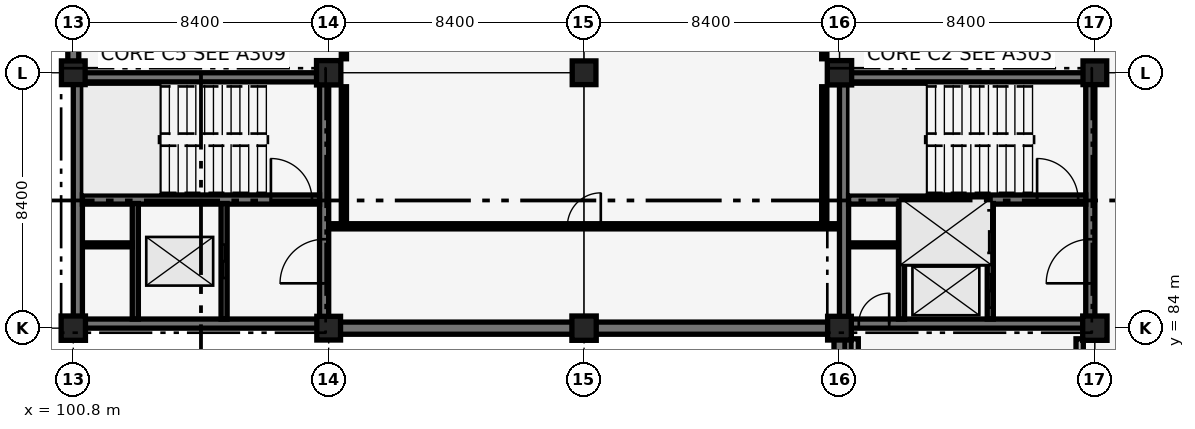
"""IFC4 building model, lengths in metres.
Left out: names, types, materials, properties, quantities, classifications, styles, units other than length and angle.
Written with IfcOpenShell. Run it as: python <this file> out.ifc"""

import sys

from ifc_helpers import new_model, si_unit, direction, frame, frame_2d, origin, origin_2d, place, context, subcontext, project, spatial, rectangle, extrude, element, fill, save


model = new_model("IFC4")
c1 = context("Model", 3, precision=1e-05, world=origin(), true_north=direction((0.0, 1.0)))
c2 = subcontext(c1, "Body", "Model", "MODEL_VIEW")
j1 = project(units=[si_unit("LENGTHUNIT", "METRE"), si_unit("PLANEANGLEUNIT", "RADIAN")], contexts=[c1])
p1 = place(None, origin())
s1 = spatial("IfcSite", under=j1, at=p1, CompositionType="ELEMENT")
p2 = place(p1, origin())
s2 = spatial("IfcBuilding", under=s1, at=p2, CompositionType="ELEMENT")
p3 = place(p2, frame((0.0, 0.0, -4.42)))
s3 = spatial("IfcBuildingStorey", under=s2, at=p3, CompositionType="ELEMENT", Elevation=-4.42)
p4 = place(p3, frame((100.8, 92.75, 0.0), z_axis=(0.0, 0.0, 1.0), x_axis=(0.0, 1.0, 0.0)))
e1 = element("IfcWall", 1, at=p4, inside=s3, PredefinedType="USERDEFINED", context=c2, shape_type="SweptSolid", body=[
    extrude(rectangle(XDim=7.7, YDim=0.36, at=frame_2d((3.85, 0.0))), origin(), (0.0, 0.0, 1.0), 4.12),
])
for number, where, z_axis, x_axis in (
    (2, (109.55, 84.0, 0.0), (0.0, 0.0, 1.0), (1.0, 0.0, 0.0)),
    (3, (117.95, 84.0, 0.0), (0.0, 0.0, 1.0), (1.0, 0.0, 0.0)),
):
    element("IfcWall", number, at=place(p3, frame(where, z_axis=z_axis, x_axis=x_axis)), inside=s3, PredefinedType="USERDEFINED", context=c2, shape_type="SweptSolid", body=[
        extrude(rectangle(XDim=7.7, YDim=0.4, at=frame_2d((3.85, 0.0))), origin(), (0.0, 0.0, 1.0), 4.12),
    ])
p5 = place(p3, frame((126.0, 75.95, 0.0), z_axis=(0.0, 0.0, 1.0), x_axis=(0.0, 1.0, 0.0)))
e4 = element("IfcWall", 4, at=p5, inside=s3, PredefinedType="USERDEFINED", context=c2, shape_type="SweptSolid", body=[
    extrude(rectangle(XDim=7.7, YDim=0.36, at=frame_2d((3.85, 0.0))), origin(), (0.0, 0.0, 1.0), 4.12),
])
p6 = place(p3, frame((126.15, 84.15, 0.0), z_axis=(0.0, 0.0, 1.0), x_axis=(1.0, 0.0, 0.0)))
e5 = element("IfcWall", 5, at=p6, inside=s3, PredefinedType="SHEAR", context=c2, shape_type="SweptSolid", body=[
    extrude(rectangle(XDim=8.1, YDim=0.3, at=frame_2d((4.05, 0.0))), origin(), (0.0, 0.0, 1.0), 4.12),
])
p7 = place(p6, frame((0.485, 0.0, 0.0)))
e6 = element("IfcOpeningElement", 6, at=p7, cuts=e5, PredefinedType="OPENING", context=c2, shape_type="SweptSolid", body=[
    extrude(rectangle(XDim=1.0, YDim=2.15, at=frame_2d((0.5, 1.075))), frame((0.0, 0.16, 0.0), z_axis=(0.0, -1.0, 0.0), x_axis=(1.0, 0.0, 0.0)), (0.0, 0.0, 1.0), 0.32),
])
for number, where, z_axis, x_axis in (
    (7, (126.15, 92.25, 0.0), (0.0, 0.0, 1.0), (1.0, 0.0, 0.0)),
    (8, (126.15, 84.15, 0.0), (0.0, 0.0, 1.0), (0.0, 1.0, 0.0)),
):
    element("IfcWall", number, at=place(p3, frame(where, z_axis=z_axis, x_axis=x_axis)), inside=s3, PredefinedType="SHEAR", context=c2, shape_type="SweptSolid", body=[
        extrude(rectangle(XDim=8.1, YDim=0.3, at=frame_2d((4.05, 0.0))), origin(), (0.0, 0.0, 1.0), 4.12),
    ])
p8 = place(p3, frame((134.25, 84.15, 0.0), z_axis=(0.0, 0.0, 1.0), x_axis=(0.0, 1.0, 0.0)))
e9 = element("IfcWall", 9, at=p8, inside=s3, PredefinedType="SHEAR", context=c2, shape_type="SweptSolid", body=[
    extrude(rectangle(XDim=8.1, YDim=0.3, at=frame_2d((4.05, 0.0))), origin(), (0.0, 0.0, 1.0), 4.12),
])
p9 = place(p8, frame((1.325, 0.0, 0.0)))
e10 = element("IfcOpeningElement", 10, at=p9, cuts=e9, PredefinedType="OPENING", context=c2, shape_type="SweptSolid", body=[
    extrude(rectangle(XDim=1.45, YDim=2.15, at=frame_2d((0.725, 1.075))), frame((0.0, 0.16, 0.0), z_axis=(0.0, -1.0, 0.0), x_axis=(1.0, 0.0, 0.0)), (0.0, 0.0, 1.0), 0.32),
])
p10 = place(p3, frame((126.3, 88.23, 0.0), z_axis=(0.0, 0.0, 1.0), x_axis=(1.0, 0.0, 0.0)))
e11 = element("IfcWall", 11, at=p10, inside=s3, PredefinedType="SHEAR", context=c2, shape_type="SweptSolid", body=[
    extrude(rectangle(XDim=7.8, YDim=0.3, at=frame_2d((3.9, 0.0))), origin(), (0.0, 0.0, 1.0), 4.12),
])
p11 = place(p10, frame((6.2, 0.0, 0.0)))
e12 = element("IfcOpeningElement", 12, at=p11, cuts=e11, PredefinedType="OPENING", context=c2, shape_type="SweptSolid", body=[
    extrude(rectangle(XDim=1.35, YDim=2.15, at=frame_2d((0.675, 1.075))), frame((0.0, 0.16, 0.0), z_axis=(0.0, -1.0, 0.0), x_axis=(1.0, 0.0, 0.0)), (0.0, 0.0, 1.0), 0.32),
])
for number, where, z_axis, x_axis in (
    (13, (100.95, 84.15, 0.0), (0.0, 0.0, 1.0), (1.0, 0.0, 0.0)),
    (14, (100.95, 92.25, 0.0), (0.0, 0.0, 1.0), (1.0, 0.0, 0.0)),
    (15, (100.95, 84.15, 0.0), (0.0, 0.0, 1.0), (0.0, 1.0, 0.0)),
):
    element("IfcWall", number, at=place(p3, frame(where, z_axis=z_axis, x_axis=x_axis)), inside=s3, PredefinedType="SHEAR", context=c2, shape_type="SweptSolid", body=[
        extrude(rectangle(XDim=8.1, YDim=0.3, at=frame_2d((4.05, 0.0))), origin(), (0.0, 0.0, 1.0), 4.12),
    ])
p12 = place(p3, frame((109.05, 84.15, 0.0), z_axis=(0.0, 0.0, 1.0), x_axis=(0.0, 1.0, 0.0)))
e16 = element("IfcWall", 16, at=p12, inside=s3, PredefinedType="SHEAR", context=c2, shape_type="SweptSolid", body=[
    extrude(rectangle(XDim=8.1, YDim=0.3, at=frame_2d((4.05, 0.0))), origin(), (0.0, 0.0, 1.0), 4.12),
])
p13 = place(p12, frame((1.325, 0.0, 0.0)))
e17 = element("IfcOpeningElement", 17, at=p13, cuts=e16, PredefinedType="OPENING", context=c2, shape_type="SweptSolid", body=[
    extrude(rectangle(XDim=1.45, YDim=2.15, at=frame_2d((0.725, 1.075))), frame((0.0, 0.16, 0.0), z_axis=(0.0, -1.0, 0.0), x_axis=(1.0, 0.0, 0.0)), (0.0, 0.0, 1.0), 0.32),
])
p14 = place(p3, frame((101.1, 88.23, 0.0), z_axis=(0.0, 0.0, 1.0), x_axis=(1.0, 0.0, 0.0)))
e18 = element("IfcWall", 18, at=p14, inside=s3, PredefinedType="SHEAR", context=c2, shape_type="SweptSolid", body=[
    extrude(rectangle(XDim=7.8, YDim=0.3, at=frame_2d((3.9, 0.0))), origin(), (0.0, 0.0, 1.0), 4.12),
])
p15 = place(p14, frame((6.2, 0.0, 0.0)))
e19 = element("IfcOpeningElement", 19, at=p15, cuts=e18, PredefinedType="OPENING", context=c2, shape_type="SweptSolid", body=[
    extrude(rectangle(XDim=1.35, YDim=2.15, at=frame_2d((0.675, 1.075))), frame((0.0, 0.16, 0.0), z_axis=(0.0, -1.0, 0.0), x_axis=(1.0, 0.0, 0.0)), (0.0, 0.0, 1.0), 0.32),
])
p16 = place(p3, frame((100.8, 84.0, -0.4), z_axis=(0.0, 0.0, 1.0), x_axis=(1.0, 0.0, 0.0)))
e20 = element("IfcColumn", 20, at=p16, inside=s3, PredefinedType="COLUMN", context=c2, shape_type="SweptSolid", body=[
    extrude(rectangle(XDim=0.8, YDim=0.8, at=origin_2d()), origin(), (0.0, 0.0, 1.0), 4.52),
])
for number, where, z_axis, x_axis in (
    (21, (100.8, 92.4, -0.4), (0.0, 0.0, 1.0), (1.0, 0.0, 0.0)),
    (22, (109.2, 84.0, -0.4), (0.0, 0.0, 1.0), (1.0, 0.0, 0.0)),
):
    element("IfcColumn", number, at=place(p3, frame(where, z_axis=z_axis, x_axis=x_axis)), inside=s3, PredefinedType="COLUMN", context=c2, shape_type="SweptSolid", body=[
        extrude(rectangle(XDim=0.78, YDim=0.78, at=origin_2d()), origin(), (0.0, 0.0, 1.0), 4.52),
    ])
for number, where, z_axis, x_axis in (
    (23, (109.2, 92.4, -0.4), (0.0, 0.0, 1.0), (1.0, 0.0, 0.0)),
    (24, (117.6, 84.0, -0.4), (0.0, 0.0, 1.0), (1.0, 0.0, 0.0)),
):
    element("IfcColumn", number, at=place(p3, frame(where, z_axis=z_axis, x_axis=x_axis)), inside=s3, PredefinedType="COLUMN", context=c2, shape_type="SweptSolid", body=[
        extrude(rectangle(XDim=0.8, YDim=0.8, at=origin_2d()), origin(), (0.0, 0.0, 1.0), 4.52),
    ])
for number, where, z_axis, x_axis in (
    (25, (117.6, 92.4, -0.4), (0.0, 0.0, 1.0), (1.0, 0.0, 0.0)),
    (26, (126.0, 84.0, -0.4), (0.0, 0.0, 1.0), (1.0, 0.0, 0.0)),
):
    element("IfcColumn", number, at=place(p3, frame(where, z_axis=z_axis, x_axis=x_axis)), inside=s3, PredefinedType="COLUMN", context=c2, shape_type="SweptSolid", body=[
        extrude(rectangle(XDim=0.78, YDim=0.78, at=origin_2d()), origin(), (0.0, 0.0, 1.0), 4.52),
    ])
for number, where, z_axis, x_axis in (
    (27, (126.0, 92.4, -0.4), (0.0, 0.0, 1.0), (1.0, 0.0, 0.0)),
    (28, (134.4, 84.0, -0.4), (0.0, 0.0, 1.0), (1.0, 0.0, 0.0)),
):
    element("IfcColumn", number, at=place(p3, frame(where, z_axis=z_axis, x_axis=x_axis)), inside=s3, PredefinedType="COLUMN", context=c2, shape_type="SweptSolid", body=[
        extrude(rectangle(XDim=0.8, YDim=0.8, at=origin_2d()), origin(), (0.0, 0.0, 1.0), 4.52),
    ])
p17 = place(p3, frame((134.4, 92.4, -0.4), z_axis=(0.0, 0.0, 1.0), x_axis=(1.0, 0.0, 0.0)))
e29 = element("IfcColumn", 29, at=p17, inside=s3, PredefinedType="COLUMN", context=c2, shape_type="SweptSolid", body=[
    extrude(rectangle(XDim=0.78, YDim=0.78, at=origin_2d()), origin(), (0.0, 0.0, 1.0), 4.52),
])
p18 = place(p3, frame((130.96, 84.3, 0.0), z_axis=(0.0, 0.0, 1.0), x_axis=(0.0, 1.0, 0.0)))
e30 = element("IfcWall", 30, at=p18, inside=s3, PredefinedType="SHEAR", context=c2, shape_type="SweptSolid", body=[
    extrude(rectangle(XDim=3.8, YDim=0.2, at=frame_2d((1.9, 0.0))), origin(), (0.0, 0.0, 1.0), 3.17),
])
p19 = place(p18, frame((0.375, 0.0, 0.0)))
e31 = element("IfcOpeningElement", 31, at=p19, cuts=e30, PredefinedType="OPENING", context=c2, shape_type="SweptSolid", body=[
    extrude(rectangle(XDim=1.1, YDim=2.15, at=frame_2d((0.55, 1.075))), frame((0.0, 0.11, 0.0), z_axis=(0.0, -1.0, 0.0), x_axis=(1.0, 0.0, 0.0)), (0.0, 0.0, 1.0), 0.22),
])
p20 = place(p18, frame((2.175, 0.0, 0.0)))
e32 = element("IfcOpeningElement", 32, at=p20, cuts=e30, PredefinedType="OPENING", context=c2, shape_type="SweptSolid", body=[
    extrude(rectangle(XDim=1.4, YDim=2.2, at=frame_2d((0.7, 1.1))), frame((0.0, 0.11, 0.0), z_axis=(0.0, -1.0, 0.0), x_axis=(1.0, 0.0, 0.0)), (0.0, 0.0, 1.0), 0.22),
])
p21 = place(p3, frame((128.04, 84.3, 0.0), z_axis=(0.0, 0.0, 1.0), x_axis=(0.0, 1.0, 0.0)))
e33 = element("IfcWall", 33, at=p21, inside=s3, PredefinedType="SHEAR", context=c2, shape_type="SweptSolid", body=[
    extrude(rectangle(XDim=3.8, YDim=0.2, at=frame_2d((1.9, 0.0))), origin(), (0.0, 0.0, 1.0), 3.17),
])
p22 = place(p3, frame((128.15, 86.2, 0.0), z_axis=(0.0, 0.0, 1.0), x_axis=(1.0, 0.0, 0.0)))
e34 = element("IfcWall", 34, at=p22, inside=s3, PredefinedType="SHEAR", context=c2, shape_type="SweptSolid", body=[
    extrude(rectangle(XDim=2.7, YDim=0.18, at=frame_2d((1.35, 0.0))), origin(), (0.0, 0.0, 1.0), 4.12),
])
p23 = place(p3, frame((126.32, 86.74, 0.0), z_axis=(0.0, 0.0, 1.0), x_axis=(1.0, 0.0, 0.0)))
e35 = element("IfcWall", 35, at=p23, inside=s3, PredefinedType="PARTITIONING", context=c2, shape_type="SweptSolid", body=[
    extrude(rectangle(XDim=1.62, YDim=0.13, at=frame_2d((0.81, 0.0))), origin(), (0.0, 0.0, 1.0), 4.12),
])
p24 = place(p3, frame((105.76, 84.3, 0.0), z_axis=(0.0, 0.0, 1.0), x_axis=(0.0, 1.0, 0.0)))
e36 = element("IfcWall", 36, at=p24, inside=s3, PredefinedType="SHEAR", context=c2, shape_type="SweptSolid", body=[
    extrude(rectangle(XDim=3.8, YDim=0.2, at=frame_2d((1.9, 0.0))), origin(), (0.0, 0.0, 1.0), 3.36),
])
p25 = place(p24, frame((1.35, 0.0, 0.0)))
e37 = element("IfcOpeningElement", 37, at=p25, cuts=e36, PredefinedType="OPENING", context=c2, shape_type="SweptSolid", body=[
    extrude(rectangle(XDim=1.1, YDim=2.15, at=frame_2d((0.55, 1.075))), frame((0.0, 0.11, 0.0), z_axis=(0.0, -1.0, 0.0), x_axis=(1.0, 0.0, 0.0)), (0.0, 0.0, 1.0), 0.22),
])
p26 = place(p3, frame((102.84, 84.3, 0.0), z_axis=(0.0, 0.0, 1.0), x_axis=(0.0, 1.0, 0.0)))
e38 = element("IfcWall", 38, at=p26, inside=s3, PredefinedType="SHEAR", context=c2, shape_type="SweptSolid", body=[
    extrude(rectangle(XDim=3.8, YDim=0.2, at=frame_2d((1.9, 0.0))), origin(), (0.0, 0.0, 1.0), 3.36),
])
p27 = place(p3, frame((101.12, 86.74, 0.0), z_axis=(0.0, 0.0, 1.0), x_axis=(1.0, 0.0, 0.0)))
e39 = element("IfcWall", 39, at=p27, inside=s3, PredefinedType="PARTITIONING", context=c2, shape_type="SweptSolid", body=[
    extrude(rectangle(XDim=1.62, YDim=0.13, at=frame_2d((0.81, 0.0))), origin(), (0.0, 0.0, 1.0), 3.35),
])
p28 = place(p3, frame((133.9, 76.05, 0.0), z_axis=(0.0, 0.0, 1.0), x_axis=(0.0, 1.0, 0.0)))
e40 = element("IfcWall", 40, at=p28, inside=s3, PredefinedType="PARTITIONING", context=c2, shape_type="SweptSolid", body=[
    extrude(rectangle(XDim=7.6, YDim=0.24, at=frame_2d((3.8, 0.0))), origin(), (0.0, 0.0, 1.0), 3.17),
])
p29 = place(p3, frame((126.5, 76.06, 0.0), z_axis=(0.0, 0.0, 1.0), x_axis=(0.0, 1.0, 0.0)))
e41 = element("IfcWall", 41, at=p29, inside=s3, PredefinedType="PARTITIONING", context=c2, shape_type="SweptSolid", body=[
    extrude(rectangle(XDim=7.59, YDim=0.24, at=frame_2d((3.795, 0.0))), origin(), (0.0, 0.0, 1.0), 3.17),
])
p30 = place(p3, frame((109.23, 87.35, 0.0), z_axis=(0.0, 0.0, 1.0), x_axis=(1.0, 0.0, 0.0)))
e42 = element("IfcWall", 42, at=p30, inside=s3, PredefinedType="PARTITIONING", context=c2, shape_type="SweptSolid", body=[
    extrude(rectangle(XDim=16.74, YDim=0.17, at=frame_2d((8.37, 0.0))), origin(), (0.0, 0.0, 1.0), 3.32),
])
p31 = place(p30, frame((7.82, 0.0, 0.0)))
e43 = element("IfcOpeningElement", 43, at=p31, cuts=e42, PredefinedType="OPENING", context=c2, shape_type="SweptSolid", body=[
    extrude(rectangle(XDim=1.1, YDim=2.15, at=frame_2d((0.55, 1.075))), frame((0.0, 0.095, 0.0), z_axis=(0.0, -1.0, 0.0), x_axis=(1.0, 0.0, 0.0)), (0.0, 0.0, 1.0), 0.19),
])
p32 = place(p3, frame((109.7, 87.5, 0.0), z_axis=(0.0, 0.0, 1.0), x_axis=(0.0, 1.0, 0.0)))
e44 = element("IfcWall", 44, at=p32, inside=s3, PredefinedType="PARTITIONING", context=c2, shape_type="SweptSolid", body=[
    extrude(rectangle(XDim=4.44, YDim=0.17, at=frame_2d((2.22, 0.0))), origin(), (0.0, 0.0, 1.0), 3.56),
])
p33 = place(p3, frame((109.7, 92.86, 0.0), z_axis=(0.0, 0.0, 1.0), x_axis=(0.0, 1.0, 0.0)))
e45 = element("IfcWall", 45, at=p33, inside=s3, PredefinedType="PARTITIONING", context=c2, shape_type="SweptSolid", body=[
    extrude(rectangle(XDim=7.49, YDim=0.17, at=frame_2d((3.745, 0.0))), origin(), (0.0, 0.0, 1.0), 3.57),
])
p34 = place(p3, frame((125.5, 87.5, 0.0), z_axis=(0.0, 0.0, 1.0), x_axis=(0.0, 1.0, 0.0)))
e46 = element("IfcWall", 46, at=p34, inside=s3, PredefinedType="PARTITIONING", context=c2, shape_type="SweptSolid", body=[
    extrude(rectangle(XDim=4.44, YDim=0.17, at=frame_2d((2.22, 0.0))), origin(), (0.0, 0.0, 1.0), 3.57),
])
p35 = place(p3, frame((125.5, 92.86, 0.0), z_axis=(0.0, 0.0, 1.0), x_axis=(0.0, 1.0, 0.0)))
e47 = element("IfcWall", 47, at=p35, inside=s3, PredefinedType="PARTITIONING", context=c2, shape_type="SweptSolid", body=[
    extrude(rectangle(XDim=7.49, YDim=0.17, at=frame_2d((3.745, 0.0))), origin(), (0.0, 0.0, 1.0), 3.56),
])
p36 = place(p11, origin())
e48 = element("IfcDoor", 48, at=p36, inside=s3, OperationType="SINGLE_SWING_LEFT", PredefinedType="DOOR", context=c2, shape_type="SweptSolid", body=[
    extrude(rectangle(XDim=1.35, YDim=2.15, at=frame_2d((0.675, 1.075))), frame((0.0, 0.025, 0.0), z_axis=(0.0, -1.0, 0.0), x_axis=(1.0, 0.0, 0.0)), (0.0, 0.0, 1.0), 0.05),
])
fill(e12, e48)
p37 = place(p19, origin())
e49 = element("IfcDoor", 49, at=p37, inside=s3, OperationType="SLIDING_TO_LEFT", PredefinedType="DOOR", context=c2, shape_type="SweptSolid", body=[
    extrude(rectangle(XDim=1.1, YDim=2.15, at=frame_2d((0.55, 1.075))), frame((0.0, 0.025, 0.0), z_axis=(0.0, -1.0, 0.0), x_axis=(1.0, 0.0, 0.0)), (0.0, 0.0, 1.0), 0.05),
])
fill(e31, e49)
p38 = place(p20, origin())
e50 = element("IfcDoor", 50, at=p38, inside=s3, OperationType="SLIDING_TO_LEFT", PredefinedType="DOOR", context=c2, shape_type="SweptSolid", body=[
    extrude(rectangle(XDim=1.4, YDim=2.2, at=frame_2d((0.7, 1.1))), frame((0.0, 0.025, 0.0), z_axis=(0.0, -1.0, 0.0), x_axis=(1.0, 0.0, 0.0)), (0.0, 0.0, 1.0), 0.05),
])
fill(e32, e50)
p39 = place(p9, origin())
e51 = element("IfcDoor", 51, at=p39, inside=s3, OperationType="DOUBLE_DOOR_SINGLE_SWING", PredefinedType="DOOR", context=c2, shape_type="SweptSolid", body=[
    extrude(rectangle(XDim=1.45, YDim=2.15, at=frame_2d((0.725, 1.075))), frame((0.0, 0.025, 0.0), z_axis=(0.0, -1.0, 0.0), x_axis=(1.0, 0.0, 0.0)), (0.0, 0.0, 1.0), 0.05),
])
fill(e10, e51)
p40 = place(p7, origin())
e52 = element("IfcDoor", 52, at=p40, inside=s3, OperationType="SINGLE_SWING_RIGHT", PredefinedType="DOOR", context=c2, shape_type="SweptSolid", body=[
    extrude(rectangle(XDim=1.0, YDim=2.15, at=frame_2d((0.5, 1.075))), frame((0.0, 0.025, 0.0), z_axis=(0.0, -1.0, 0.0), x_axis=(1.0, 0.0, 0.0)), (0.0, 0.0, 1.0), 0.05),
])
fill(e6, e52)
p41 = place(p15, origin())
e53 = element("IfcDoor", 53, at=p41, inside=s3, OperationType="SINGLE_SWING_LEFT", PredefinedType="DOOR", context=c2, shape_type="SweptSolid", body=[
    extrude(rectangle(XDim=1.35, YDim=2.15, at=frame_2d((0.675, 1.075))), frame((0.0, 0.025, 0.0), z_axis=(0.0, -1.0, 0.0), x_axis=(1.0, 0.0, 0.0)), (0.0, 0.0, 1.0), 0.05),
])
fill(e19, e53)
p42 = place(p25, origin())
e54 = element("IfcDoor", 54, at=p42, inside=s3, OperationType="SLIDING_TO_LEFT", PredefinedType="DOOR", context=c2, shape_type="SweptSolid", body=[
    extrude(rectangle(XDim=1.1, YDim=2.15, at=frame_2d((0.55, 1.075))), frame((0.0, 0.025, 0.0), z_axis=(0.0, -1.0, 0.0), x_axis=(1.0, 0.0, 0.0)), (0.0, 0.0, 1.0), 0.05),
])
fill(e37, e54)
p43 = place(p13, origin())
e55 = element("IfcDoor", 55, at=p43, inside=s3, OperationType="DOUBLE_DOOR_SINGLE_SWING", PredefinedType="DOOR", context=c2, shape_type="SweptSolid", body=[
    extrude(rectangle(XDim=1.45, YDim=2.15, at=frame_2d((0.725, 1.075))), frame((0.0, 0.025, 0.0), z_axis=(0.0, -1.0, 0.0), x_axis=(1.0, 0.0, 0.0)), (0.0, 0.0, 1.0), 0.05),
])
fill(e17, e55)
p44 = place(p31, origin())
e56 = element("IfcDoor", 56, at=p44, inside=s3, OperationType="SINGLE_SWING_RIGHT", PredefinedType="DOOR", context=c2, shape_type="SweptSolid", body=[
    extrude(rectangle(XDim=1.1, YDim=2.15, at=frame_2d((0.55, 1.075))), frame((0.0, 0.025, 0.0), z_axis=(0.0, -1.0, 0.0), x_axis=(1.0, 0.0, 0.0)), (0.0, 0.0, 1.0), 0.05),
])
fill(e43, e56)
save(model, sys.argv[1])
